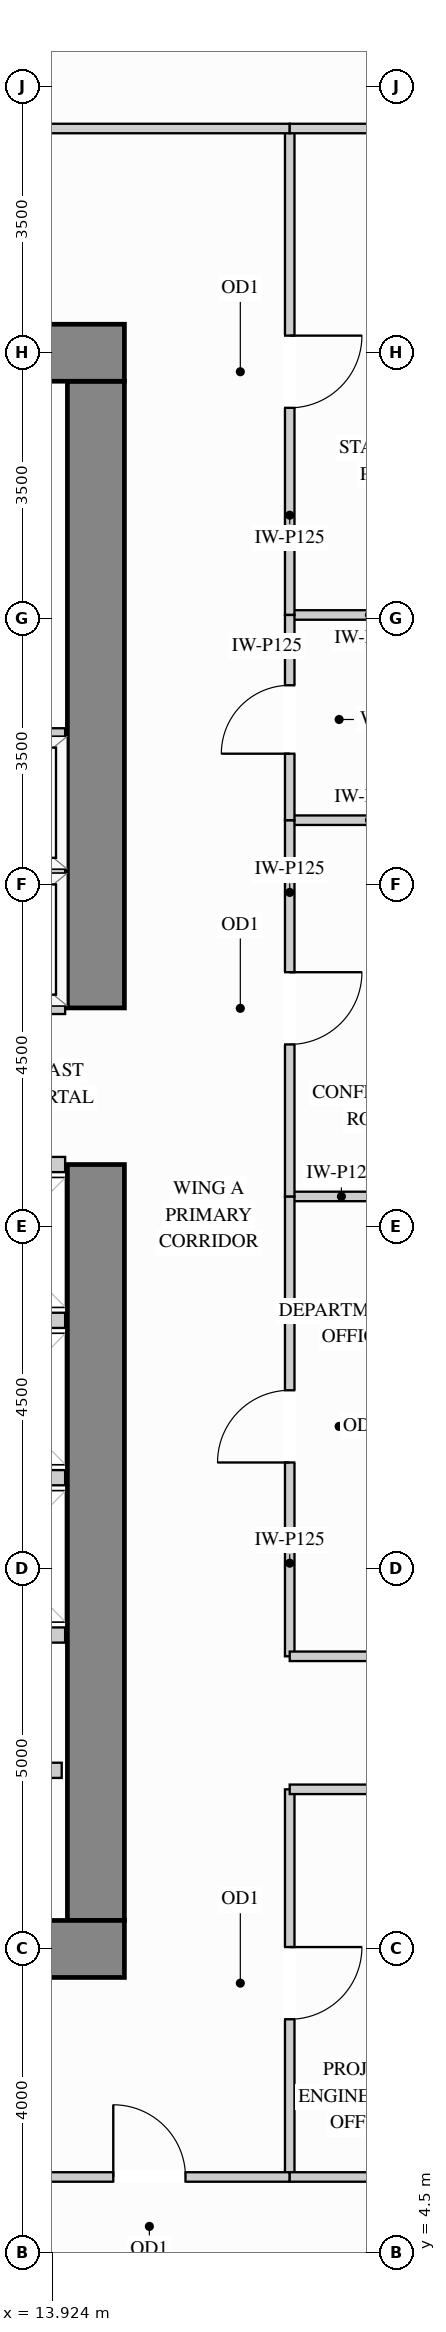
"""IFC4 building model, lengths in metres.
Left out: names, types, materials, properties, quantities, classifications, styles, units other than length and angle.
Written with IfcOpenShell. Run it as: python <this file> out.ifc"""

import sys

from ifc_helpers import new_model, si_unit, direction, frame, frame_2d, origin, place, context, subcontext, project, spatial, rectangle, extrude, source, transform, mapped, element, fill, save


model = new_model("IFC4")
c1 = context("Model", 3, precision=1e-05, world=origin(), true_north=direction((0.0, 1.0)))
c2 = subcontext(c1, "Body", "Model", "MODEL_VIEW")
j1 = project(units=[si_unit("LENGTHUNIT", "METRE"), si_unit("PLANEANGLEUNIT", "RADIAN")], contexts=[c1])
p1 = place(None, origin())
s1 = spatial("IfcSite", under=j1, at=p1, CompositionType="ELEMENT")
p2 = place(p1, origin())
s2 = spatial("IfcBuilding", under=s1, at=p2, CompositionType="ELEMENT")
p3 = place(p2, frame((0.0, 0.0, 81.0)))
s3 = spatial("IfcBuildingStorey", under=s2, at=p3, CompositionType="ELEMENT", Elevation=81.0)
m1 = source(origin(), c2, "Body", "SweptSolid", [
    extrude(rectangle(XDim=9.945, YDim=0.75, at=frame_2d((4.973, 0.0))), origin(), (0.0, 0.0, 1.0), 3.38),
])
p4 = place(p3, frame((14.5, 8.875, 0.0), z_axis=(0.0, 0.0, 1.0), x_axis=(0.0, 1.0, 0.0)))
e1 = element("IfcWall", 1, at=p4, inside=s3, PredefinedType="SHEAR", context=c2, shape_type="MappedRepresentation", body=[
    mapped(m1, transform((0.0, 0.0, 0.0), x_axis=(1.0, 0.0, 0.0), y_axis=(0.0, 1.0, 0.0), z_axis=(0.0, 0.0, 1.0))),
])
m2 = source(origin(), c2, "Body", "SweptSolid", [
    extrude(rectangle(XDim=8.245, YDim=0.75, at=frame_2d((4.123, 0.0))), origin(), (0.0, 0.0, 1.0), 3.38),
])
p5 = place(p3, frame((14.5, 20.88, 0.0), z_axis=(0.0, 0.0, 1.0), x_axis=(0.0, 1.0, 0.0)))
e2 = element("IfcWall", 2, at=p5, inside=s3, PredefinedType="SHEAR", context=c2, shape_type="MappedRepresentation", body=[
    mapped(m2, transform((0.0, 0.0, 0.0), x_axis=(1.0, 0.0, 0.0), y_axis=(0.0, 1.0, 0.0), z_axis=(0.0, 0.0, 1.0))),
])
m3 = source(origin(), c2, "Body", "SweptSolid", [
    extrude(rectangle(XDim=10.75, YDim=0.75, at=frame_2d((5.375, 0.0))), origin(), (0.0, 0.0, 1.0), 3.38),
])
for number, where, z_axis, x_axis in (
    (3, (4.125, 29.5, 0.0), (0.0, 0.0, 1.0), (1.0, 0.0, 0.0)),
    (4, (4.125, 8.5, 0.0), (0.0, 0.0, 1.0), (1.0, 0.0, 0.0)),
):
    element("IfcWall", number, at=place(p3, frame(where, z_axis=z_axis, x_axis=x_axis)), inside=s3, PredefinedType="SHEAR", context=c2, shape_type="MappedRepresentation", body=[
        mapped(m3, transform((0.0, 0.0, 0.0), x_axis=(1.0, 0.0, 0.0), y_axis=(0.0, 1.0, 0.0), z_axis=(0.0, 0.0, 1.0))),
    ])
m4 = source(origin(), c2, "Body", "SweptSolid", [
    extrude(rectangle(XDim=1.36, YDim=0.125, at=frame_2d((0.68, 0.0))), origin(), (0.0, 0.0, 1.0), 3.365),
])
p6 = place(p3, frame((17.05, 18.4, 0.0), z_axis=(0.0, 0.0, 1.0), x_axis=(1.0, 0.0, 0.0)))
e5 = element("IfcWall", 5, at=p6, inside=s3, PredefinedType="PARTITIONING", context=c2, shape_type="MappedRepresentation", body=[
    mapped(m4, transform((0.0, 0.0, 0.0), x_axis=(1.0, 0.0, 0.0), y_axis=(0.0, 1.0, 0.0), z_axis=(0.0, 0.0, 1.0))),
])
m5 = source(origin(), c2, "Body", "SweptSolid", [
    extrude(rectangle(XDim=2.098, YDim=0.125, at=frame_2d((1.049, 0.0))), origin(), (0.0, 0.0, 1.0), 3.365),
])
for number, where, z_axis, x_axis in (
    (6, (17.05, 23.35, 0.0), (0.0, 0.0, 1.0), (1.0, 0.0, 0.0)),
    (7, (17.05, 26.05, 0.0), (0.0, 0.0, 1.0), (1.0, 0.0, 0.0)),
):
    element("IfcWall", number, at=place(p3, frame(where, z_axis=z_axis, x_axis=x_axis)), inside=s3, PredefinedType="PARTITIONING", context=c2, shape_type="MappedRepresentation", body=[
        mapped(m5, transform((0.0, 0.0, 0.0), x_axis=(1.0, 0.0, 0.0), y_axis=(0.0, 1.0, 0.0), z_axis=(0.0, 0.0, 1.0))),
    ])
p7 = place(p3, frame((17.05, 12.35, 0.0), z_axis=(0.0, 0.0, 1.0), x_axis=(0.0, 1.0, 0.0)))
e8 = element("IfcWall", 8, at=p7, inside=s3, PredefinedType="PARTITIONING", context=c2, shape_type="SweptSolid", body=[
    extrude(rectangle(XDim=6.05, YDim=0.125, at=frame_2d((3.025, 0.0))), origin(), (0.0, 0.0, 1.0), 3.365),
])
p8 = place(p7, frame((2.55, 0.0, 0.0)))
e9 = element("IfcOpeningElement", 9, at=p8, cuts=e8, PredefinedType="OPENING", context=c2, shape_type="SweptSolid", body=[
    extrude(rectangle(XDim=0.95, YDim=2.15, at=frame_2d((0.475, 1.075))), frame((0.0, 0.073, 0.0), z_axis=(0.0, -1.0, 0.0), x_axis=(1.0, 0.0, 0.0)), (0.0, 0.0, 1.0), 0.145),
])
p9 = place(p3, frame((17.05, 18.4, 0.0), z_axis=(0.0, 0.0, 1.0), x_axis=(0.0, 1.0, 0.0)))
e10 = element("IfcWall", 10, at=p9, inside=s3, PredefinedType="PARTITIONING", context=c2, shape_type="SweptSolid", body=[
    extrude(rectangle(XDim=4.95, YDim=0.125, at=frame_2d((2.475, 0.0))), origin(), (0.0, 0.0, 1.0), 3.365),
])
p10 = place(p9, frame((2.0, 0.0, 0.0)))
e11 = element("IfcOpeningElement", 11, at=p10, cuts=e10, PredefinedType="OPENING", context=c2, shape_type="SweptSolid", body=[
    extrude(rectangle(XDim=0.95, YDim=2.15, at=frame_2d((0.475, 1.075))), frame((0.0, 0.073, 0.0), z_axis=(0.0, -1.0, 0.0), x_axis=(1.0, 0.0, 0.0)), (0.0, 0.0, 1.0), 0.145),
])
p11 = place(p3, frame((17.05, 26.05, 0.0), z_axis=(0.0, 0.0, 1.0), x_axis=(0.0, 1.0, 0.0)))
e12 = element("IfcWall", 12, at=p11, inside=s3, PredefinedType="PARTITIONING", context=c2, shape_type="SweptSolid", body=[
    extrude(rectangle(XDim=6.4, YDim=0.125, at=frame_2d((3.2, 0.0))), origin(), (0.0, 0.0, 1.0), 3.365),
])
p12 = place(p11, frame((2.725, 0.0, 0.0)))
e13 = element("IfcOpeningElement", 13, at=p12, cuts=e12, PredefinedType="OPENING", context=c2, shape_type="SweptSolid", body=[
    extrude(rectangle(XDim=0.95, YDim=2.15, at=frame_2d((0.475, 1.075))), frame((0.0, 0.073, 0.0), z_axis=(0.0, -1.0, 0.0), x_axis=(1.0, 0.0, 0.0)), (0.0, 0.0, 1.0), 0.145),
])
p13 = place(p3, frame((17.05, 5.5, 0.0), z_axis=(0.0, 0.0, 1.0), x_axis=(0.0, 1.0, 0.0)))
e14 = element("IfcWall", 14, at=p13, inside=s3, PredefinedType="PARTITIONING", context=c2, shape_type="SweptSolid", body=[
    extrude(rectangle(XDim=5.1, YDim=0.125, at=frame_2d((2.55, 0.0))), origin(), (0.0, 0.0, 1.0), 3.365),
])
p14 = place(p13, frame((2.075, 0.0, 0.0)))
e15 = element("IfcOpeningElement", 15, at=p14, cuts=e14, PredefinedType="OPENING", context=c2, shape_type="SweptSolid", body=[
    extrude(rectangle(XDim=0.95, YDim=2.15, at=frame_2d((0.475, 1.075))), frame((0.0, 0.073, 0.0), z_axis=(0.0, -1.0, 0.0), x_axis=(1.0, 0.0, 0.0)), (0.0, 0.0, 1.0), 0.145),
])
p15 = place(p3, frame((17.05, 23.35, 0.0), z_axis=(0.0, 0.0, 1.0), x_axis=(0.0, 1.0, 0.0)))
e16 = element("IfcWall", 16, at=p15, inside=s3, PredefinedType="PARTITIONING", context=c2, shape_type="SweptSolid", body=[
    extrude(rectangle(XDim=2.7, YDim=0.125, at=frame_2d((1.35, 0.0))), origin(), (0.0, 0.0, 1.0), 3.365),
])
p16 = place(p15, frame((0.875, 0.0, 0.0)))
e17 = element("IfcOpeningElement", 17, at=p16, cuts=e16, PredefinedType="OPENING", context=c2, shape_type="SweptSolid", body=[
    extrude(rectangle(XDim=0.9, YDim=2.15, at=frame_2d((0.45, 1.075))), frame((0.0, 0.073, 0.0), z_axis=(0.0, -1.0, 0.0), x_axis=(1.0, 0.0, 0.0)), (0.0, 0.0, 1.0), 0.145),
])
p17 = place(p3, frame((9.039, 32.45, 0.0), z_axis=(0.0, 0.0, 1.0), x_axis=(1.0, 0.0, 0.0)))
e18 = element("IfcWall", 18, at=p17, inside=s3, PredefinedType="PARTITIONING", context=c2, shape_type="SweptSolid", body=[
    extrude(rectangle(XDim=8.011, YDim=0.125, at=frame_2d((4.005, 0.0))), origin(), (0.0, 0.0, 1.0), 3.365),
])
p18 = place(p17, frame((3.531, 0.0, 0.0)))
e19 = element("IfcOpeningElement", 19, at=p18, cuts=e18, PredefinedType="OPENING", context=c2, shape_type="SweptSolid", body=[
    extrude(rectangle(XDim=0.95, YDim=2.15, at=frame_2d((0.475, 1.075))), frame((0.0, 0.073, 0.0), z_axis=(0.0, -1.0, 0.0), x_axis=(1.0, 0.0, 0.0)), (0.0, 0.0, 1.0), 0.145),
])
p19 = place(p3, frame((17.05, 32.45, 0.0), z_axis=(0.0, 0.0, 1.0), x_axis=(1.0, 0.0, 0.0)))
e20 = element("IfcWall", 20, at=p19, inside=s3, PredefinedType="PARTITIONING", context=c2, shape_type="MappedRepresentation", body=[
    mapped(m5, transform((0.0, 0.0, 0.0), x_axis=(1.0, 0.0, 0.0), y_axis=(0.0, 1.0, 0.0), z_axis=(0.0, 0.0, 1.0))),
])
m6 = source(origin(), c2, "Body", "SweptSolid", [
    extrude(rectangle(XDim=2.45, YDim=0.125, at=frame_2d((1.225, 0.0))), origin(), (0.0, 0.0, 1.0), 3.365),
])
for number, where, z_axis, x_axis in (
    (21, (17.05, 12.35, 0.0), (0.0, 0.0, 1.0), (1.0, 0.0, 0.0)),
    (22, (17.05, 10.6, 0.0), (0.0, 0.0, 1.0), (1.0, 0.0, 0.0)),
):
    element("IfcWall", number, at=place(p3, frame(where, z_axis=z_axis, x_axis=x_axis)), inside=s3, PredefinedType="PARTITIONING", context=c2, shape_type="MappedRepresentation", body=[
        mapped(m6, transform((0.0, 0.0, 0.0), x_axis=(1.0, 0.0, 0.0), y_axis=(0.0, 1.0, 0.0), z_axis=(0.0, 0.0, 1.0))),
    ])
p20 = place(p3, frame((13.357, 5.5, 0.0), z_axis=(0.0, 0.0, 1.0), x_axis=(1.0, 0.0, 0.0)))
e23 = element("IfcWall", 23, at=p20, inside=s3, PredefinedType="PARTITIONING", context=c2, shape_type="SweptSolid", body=[
    extrude(rectangle(XDim=3.693, YDim=0.125, at=frame_2d((1.847, 0.0))), origin(), (0.0, 0.0, 1.0), 3.365),
])
p21 = place(p20, frame((1.372, 0.0, 0.0)))
e24 = element("IfcOpeningElement", 24, at=p21, cuts=e23, PredefinedType="OPENING", context=c2, shape_type="SweptSolid", body=[
    extrude(rectangle(XDim=0.95, YDim=2.15, at=frame_2d((0.475, 1.075))), frame((0.0, 0.073, 0.0), z_axis=(0.0, -1.0, 0.0), x_axis=(1.0, 0.0, 0.0)), (0.0, 0.0, 1.0), 0.145),
])
m7 = source(origin(), c2, "Body", "SweptSolid", [
    extrude(rectangle(XDim=2.1, YDim=0.125, at=frame_2d((1.05, 0.0))), origin(), (0.0, 0.0, 1.0), 3.365),
])
p22 = place(p3, frame((17.05, 5.5, 0.0), z_axis=(0.0, 0.0, 1.0), x_axis=(1.0, 0.0, 0.0)))
e25 = element("IfcWall", 25, at=p22, inside=s3, PredefinedType="PARTITIONING", context=c2, shape_type="MappedRepresentation", body=[
    mapped(m7, transform((0.0, 0.0, 0.0), x_axis=(1.0, 0.0, 0.0), y_axis=(0.0, 1.0, 0.0), z_axis=(0.0, 0.0, 1.0))),
])
m8 = source(origin(), c2, "Body", "SweptSolid", [
    extrude(rectangle(XDim=1.63, YDim=0.2, at=frame_2d((0.815, 0.0))), origin(), (0.0, 0.0, 1.0), 3.365),
])
p23 = place(p3, frame((12.42, 10.85, 0.0), z_axis=(0.0, 0.0, 1.0), x_axis=(1.0, 0.0, 0.0)))
e26 = element("IfcWall", 26, at=p23, inside=s3, PredefinedType="PARTITIONING", context=c2, shape_type="MappedRepresentation", body=[
    mapped(m8, transform((0.0, 0.0, 0.0), x_axis=(1.0, 0.0, 0.0), y_axis=(0.0, 1.0, 0.0), z_axis=(0.0, 0.0, 1.0))),
])
m9 = source(origin(), c2, "Body", "SweptSolid", [
    extrude(rectangle(XDim=2.265, YDim=0.2, at=frame_2d((1.132, 0.0))), origin(), (0.0, 0.0, 1.0), 3.365),
])
for number, where, z_axis, x_axis in (
    (27, (11.83, 22.66, 0.0), (0.0, 0.0, 1.0), (1.0, 0.0, 0.0)),
    (28, (11.83, 20.9, 0.0), (0.0, 0.0, 1.0), (1.0, 0.0, 0.0)),
    (29, (11.83, 24.46, 0.0), (0.0, 0.0, 1.0), (1.0, 0.0, 0.0)),
):
    element("IfcWall", number, at=place(p3, frame(where, z_axis=z_axis, x_axis=x_axis)), inside=s3, PredefinedType="PARTITIONING", context=c2, shape_type="MappedRepresentation", body=[
        mapped(m9, transform((0.0, 0.0, 0.0), x_axis=(1.0, 0.0, 0.0), y_axis=(0.0, 1.0, 0.0), z_axis=(0.0, 0.0, 1.0))),
    ])
m10 = source(origin(), c2, "Body", "SweptSolid", [
    extrude(rectangle(XDim=1.865, YDim=0.2, at=frame_2d((0.933, 0.0))), origin(), (0.0, 0.0, 1.0), 3.365),
])
for number, where, z_axis, x_axis in (
    (30, (12.23, 14.7, 0.0), (0.0, 0.0, 1.0), (1.0, 0.0, 0.0)),
    (31, (12.23, 12.63, 0.0), (0.0, 0.0, 1.0), (1.0, 0.0, 0.0)),
    (32, (12.23, 16.77, 0.0), (0.0, 0.0, 1.0), (1.0, 0.0, 0.0)),
    (33, (12.23, 18.82, 0.0), (0.0, 0.0, 1.0), (1.0, 0.0, 0.0)),
):
    element("IfcWall", number, at=place(p3, frame(where, z_axis=z_axis, x_axis=x_axis)), inside=s3, PredefinedType="PARTITIONING", context=c2, shape_type="MappedRepresentation", body=[
        mapped(m10, transform((0.0, 0.0, 0.0), x_axis=(1.0, 0.0, 0.0), y_axis=(0.0, 1.0, 0.0), z_axis=(0.0, 0.0, 1.0))),
    ])
m11 = source(origin(), c2, "Body", "SweptSolid", [
    extrude(rectangle(XDim=0.95, YDim=2.15, at=frame_2d((0.475, 1.075))), frame((0.0, 0.025, 0.0), z_axis=(0.0, -1.0, 0.0), x_axis=(1.0, 0.0, 0.0)), (0.0, 0.0, 1.0), 0.05),
])
p24 = place(p14, origin())
e34 = element("IfcDoor", 34, at=p24, inside=s3, OperationType="SINGLE_SWING_RIGHT", PredefinedType="DOOR", context=c2, shape_type="MappedRepresentation", body=[
    mapped(m11, transform((0.0, 0.0, 0.0), x_axis=(1.0, 0.0, 0.0), y_axis=(0.0, 1.0, 0.0), z_axis=(0.0, 0.0, 1.0))),
])
fill(e15, e34)
p25 = place(p8, origin())
e35 = element("IfcDoor", 35, at=p25, inside=s3, OperationType="SINGLE_SWING_LEFT", PredefinedType="DOOR", context=c2, shape_type="MappedRepresentation", body=[
    mapped(m11, transform((0.0, 0.0, 0.0), x_axis=(1.0, 0.0, 0.0), y_axis=(0.0, 1.0, 0.0), z_axis=(0.0, 0.0, 1.0))),
])
fill(e9, e35)
p26 = place(p10, origin())
e36 = element("IfcDoor", 36, at=p26, inside=s3, OperationType="SINGLE_SWING_RIGHT", PredefinedType="DOOR", context=c2, shape_type="MappedRepresentation", body=[
    mapped(m11, transform((0.0, 0.0, 0.0), x_axis=(1.0, 0.0, 0.0), y_axis=(0.0, 1.0, 0.0), z_axis=(0.0, 0.0, 1.0))),
])
fill(e11, e36)
p27 = place(p12, origin())
e37 = element("IfcDoor", 37, at=p27, inside=s3, OperationType="SINGLE_SWING_RIGHT", PredefinedType="DOOR", context=c2, shape_type="MappedRepresentation", body=[
    mapped(m11, transform((0.0, 0.0, 0.0), x_axis=(1.0, 0.0, 0.0), y_axis=(0.0, 1.0, 0.0), z_axis=(0.0, 0.0, 1.0))),
])
fill(e13, e37)
p28 = place(p21, origin())
e38 = element("IfcDoor", 38, at=p28, inside=s3, OperationType="SINGLE_SWING_LEFT", PredefinedType="DOOR", context=c2, shape_type="MappedRepresentation", body=[
    mapped(m11, transform((0.0, 0.0, 0.0), x_axis=(1.0, 0.0, 0.0), y_axis=(0.0, 1.0, 0.0), z_axis=(0.0, 0.0, 1.0))),
])
fill(e24, e38)
m12 = source(origin(), c2, "Body", "SweptSolid", [
    extrude(rectangle(XDim=0.9, YDim=2.15, at=frame_2d((0.45, 1.075))), frame((0.0, 0.025, 0.0), z_axis=(0.0, -1.0, 0.0), x_axis=(1.0, 0.0, 0.0)), (0.0, 0.0, 1.0), 0.05),
])
p29 = place(p16, origin())
e39 = element("IfcDoor", 39, at=p29, inside=s3, OperationType="SINGLE_SWING_LEFT", PredefinedType="DOOR", context=c2, shape_type="MappedRepresentation", body=[
    mapped(m12, transform((0.0, 0.0, 0.0), x_axis=(1.0, 0.0, 0.0), y_axis=(0.0, 1.0, 0.0), z_axis=(0.0, 0.0, 1.0))),
])
fill(e17, e39)
save(model, sys.argv[1])
